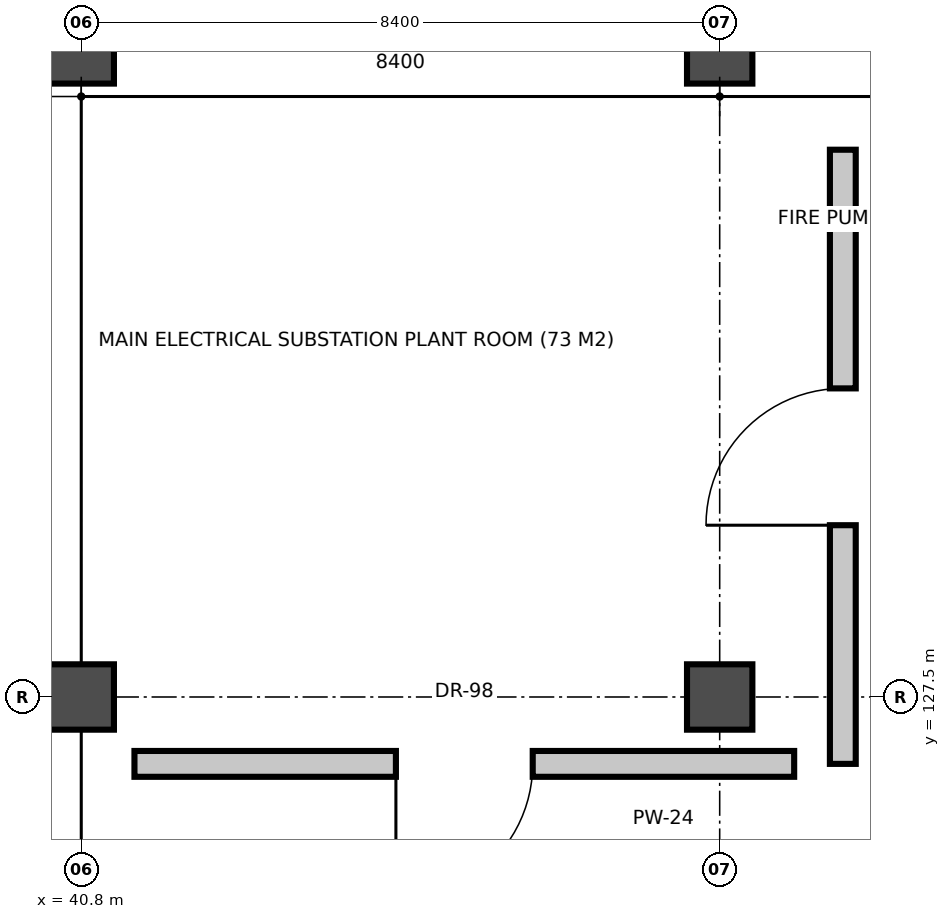
"""IFC4 building model, lengths in metres.
Left out: names, types, materials, properties, quantities, classifications, styles, units other than length and angle.
Written with IfcOpenShell. Run it as: python <this file> out.ifc"""

import sys

from ifc_helpers import new_model, si_unit, direction, frame, frame_2d, origin, origin_2d, place, context, subcontext, project, spatial, rectangle, extrude, element, fill, save


model = new_model("IFC4")
c1 = context("Model", 3, precision=1e-05, world=origin(), true_north=direction((0.0, 1.0)))
c2 = subcontext(c1, "Body", "Model", "MODEL_VIEW")
j1 = project(units=[si_unit("LENGTHUNIT", "METRE"), si_unit("PLANEANGLEUNIT", "RADIAN")], contexts=[c1])
p1 = place(None, origin())
s1 = spatial("IfcSite", under=j1, at=p1, CompositionType="ELEMENT")
p2 = place(p1, origin())
s2 = spatial("IfcBuilding", under=s1, at=p2, CompositionType="ELEMENT")
p3 = place(p2, frame((0.0, 0.0, -5.4)))
s3 = spatial("IfcBuildingStorey", under=s2, at=p3, CompositionType="ELEMENT", Elevation=-5.4)
for number, where, z_axis, x_axis in (
    (1, (40.8, 127.5, 0.0), (0.0, 0.0, 1.0), (1.0, 0.0, 0.0)),
    (2, (40.8, 136.0, 0.0), (0.0, 0.0, 1.0), (1.0, 0.0, 0.0)),
    (3, (49.2, 127.5, 0.0), (0.0, 0.0, 1.0), (1.0, 0.0, 0.0)),
    (4, (49.2, 136.0, 0.0), (0.0, 0.0, 1.0), (1.0, 0.0, 0.0)),
):
    element("IfcColumn", number, at=place(p3, frame(where, z_axis=z_axis, x_axis=x_axis)), inside=s3, PredefinedType="COLUMN", context=c2, shape_type="SweptSolid", body=[
        extrude(rectangle(XDim=0.86, YDim=0.86, at=origin_2d()), origin(), (0.0, 0.0, 1.0), 5.4),
    ])
p4 = place(p3, frame((50.18, 126.62, 0.0), z_axis=(0.0, 0.0, 1.0), x_axis=(-1.0, 0.0, 0.0)))
e5 = element("IfcWall", 5, at=p4, inside=s3, PredefinedType="PARTITIONING", context=c2, shape_type="SweptSolid", body=[
    extrude(rectangle(XDim=8.68, YDim=0.34, at=frame_2d((4.34, 0.0))), origin(), (0.0, 0.0, 1.0), 4.02),
])
p5 = place(p4, frame((3.44, 0.0, 0.0)))
e6 = element("IfcOpeningElement", 6, at=p5, cuts=e5, PredefinedType="OPENING", context=c2, shape_type="SweptSolid", body=[
    extrude(rectangle(XDim=1.8, YDim=2.34, at=frame_2d((0.9, 1.17))), frame((0.0, 0.18, 0.0), z_axis=(0.0, -1.0, 0.0), x_axis=(1.0, 0.0, 0.0)), (0.0, 0.0, 1.0), 0.36),
])
p6 = place(p3, frame((50.82, 126.62, 0.0), z_axis=(0.0, 0.0, 1.0), x_axis=(0.0, 1.0, 0.0)))
e7 = element("IfcWall", 7, at=p6, inside=s3, PredefinedType="PARTITIONING", context=c2, shape_type="SweptSolid", body=[
    extrude(rectangle(XDim=8.08, YDim=0.34, at=frame_2d((4.04, 0.0))), origin(), (0.0, 0.0, 1.0), 3.974),
])
p7 = place(p6, frame((3.14, 0.0, 0.0)))
e8 = element("IfcOpeningElement", 8, at=p7, cuts=e7, PredefinedType="OPENING", context=c2, shape_type="SweptSolid", body=[
    extrude(rectangle(XDim=1.8, YDim=2.34, at=frame_2d((0.9, 1.17))), frame((0.0, 0.18, 0.0), z_axis=(0.0, -1.0, 0.0), x_axis=(1.0, 0.0, 0.0)), (0.0, 0.0, 1.0), 0.36),
])
p8 = place(p5, origin())
e9 = element("IfcDoor", 9, at=p8, inside=s3, OperationType="SINGLE_SWING_RIGHT", PredefinedType="DOOR", context=c2, shape_type="SweptSolid", body=[
    extrude(rectangle(XDim=1.8, YDim=2.34, at=frame_2d((0.9, 1.17))), frame((0.0, 0.025, 0.0), z_axis=(0.0, -1.0, 0.0), x_axis=(1.0, 0.0, 0.0)), (0.0, 0.0, 1.0), 0.05),
])
fill(e6, e9)
p9 = place(p7, origin())
e10 = element("IfcDoor", 10, at=p9, inside=s3, OperationType="SINGLE_SWING_LEFT", PredefinedType="DOOR", context=c2, shape_type="SweptSolid", body=[
    extrude(rectangle(XDim=1.8, YDim=2.34, at=frame_2d((0.9, 1.17))), frame((0.0, 0.025, 0.0), z_axis=(0.0, -1.0, 0.0), x_axis=(1.0, 0.0, 0.0)), (0.0, 0.0, 1.0), 0.05),
])
fill(e8, e10)
save(model, sys.argv[1])
